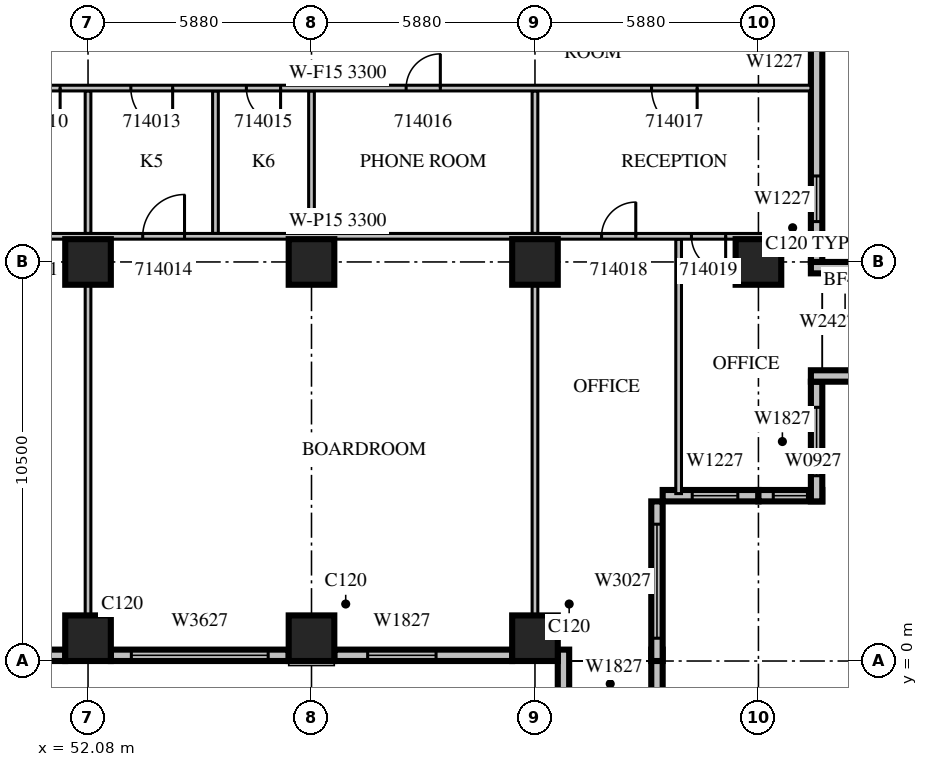
"""IFC4 building model, lengths in metres.
Left out: names, types, materials, properties, quantities, classifications, styles, units other than length and angle.
Written with IfcOpenShell. Run it as: python <this file> out.ifc"""

import sys

from ifc_helpers import new_model, si_unit, direction, frame, frame_2d, origin, origin_2d, place, context, subcontext, project, spatial, rectangle, extrude, source, transform, mapped, element, fill, save


model = new_model("IFC4")
c1 = context("Model", 3, precision=1e-05, world=origin(), true_north=direction((0.0, 1.0)))
c2 = subcontext(c1, "Body", "Model", "MODEL_VIEW")
j1 = project(units=[si_unit("LENGTHUNIT", "METRE"), si_unit("PLANEANGLEUNIT", "RADIAN")], contexts=[c1])
p1 = place(None, origin())
s1 = spatial("IfcSite", under=j1, at=p1, CompositionType="ELEMENT")
p2 = place(p1, origin())
s2 = spatial("IfcBuilding", under=s1, at=p2, CompositionType="ELEMENT")
p3 = place(p2, frame((0.0, 0.0, 69.9)))
s3 = spatial("IfcBuildingStorey", under=s2, at=p3, CompositionType="ELEMENT", Elevation=69.9)
m1 = source(origin(), c2, "Body", "SweptSolid", [
    extrude(rectangle(XDim=1.2, YDim=1.2, at=origin_2d()), origin(), (0.0, 0.0, 1.0), 4.2),
])
for number, where, z_axis, x_axis in (
    (1, (52.08, 0.6, 0.0), (0.0, 0.0, 1.0), (1.0, 0.0, 0.0)),
    (2, (57.96, 0.6, 0.0), (0.0, 0.0, 1.0), (1.0, 0.0, 0.0)),
    (3, (63.84, 0.6, 0.0), (0.0, 0.0, 1.0), (1.0, 0.0, 0.0)),
    (4, (52.08, 10.5, 0.0), (0.0, 0.0, 1.0), (1.0, 0.0, 0.0)),
    (5, (57.96, 10.5, 0.0), (0.0, 0.0, 1.0), (1.0, 0.0, 0.0)),
    (6, (63.84, 10.5, 0.0), (0.0, 0.0, 1.0), (1.0, 0.0, 0.0)),
    (7, (69.72, 10.5, 0.0), (0.0, 0.0, 1.0), (1.0, 0.0, 0.0)),
):
    element("IfcColumn", number, at=place(p3, frame(where, z_axis=z_axis, x_axis=x_axis)), inside=s3, PredefinedType="COLUMN", context=c2, shape_type="MappedRepresentation", body=[
        mapped(m1, transform((0.0, 0.0, 0.0), scale=1.0)),
    ])
m2 = source(origin(), c2, "Body", "SweptSolid", [
    extrude(rectangle(XDim=4.68, YDim=0.3, at=frame_2d((2.34, 0.0))), origin(), (0.0, 0.0, 1.0), 3.3),
])
p4 = place(p3, frame((46.8, 0.15, 0.0), z_axis=(0.0, 0.0, 1.0), x_axis=(1.0, 0.0, 0.0)))
e8 = element("IfcWall", 8, at=p4, inside=s3, PredefinedType="STANDARD", context=c2, shape_type="MappedRepresentation", body=[
    mapped(m2, transform((0.0, 0.0, 0.0), scale=1.0)),
])
m3 = source(origin(), c2, "Body", "SweptSolid", [
    extrude(rectangle(XDim=3.6, YDim=2.7, at=frame_2d((1.8, 1.35))), frame((0.0, 0.16, 0.0), z_axis=(0.0, -1.0, 0.0), x_axis=(1.0, 0.0, 0.0)), (0.0, 0.0, 1.0), 0.32),
])
p5 = place(p4, frame((0.54, 0.0, 0.6)))
e9 = element("IfcOpeningElement", 9, at=p5, cuts=e8, PredefinedType="OPENING", context=c2, shape_type="MappedRepresentation", body=[
    mapped(m3, transform((0.0, 0.0, 0.0), scale=1.0)),
])
m4 = source(origin(), c2, "Body", "SweptSolid", [
    extrude(rectangle(XDim=4.68, YDim=0.3, at=frame_2d((2.34, 0.0))), origin(), (0.0, 0.0, 1.0), 3.8),
])
p6 = place(p3, frame((52.68, 0.15, 0.0), z_axis=(0.0, 0.0, 1.0), x_axis=(1.0, 0.0, 0.0)))
e10 = element("IfcWall", 10, at=p6, inside=s3, PredefinedType="STANDARD", context=c2, shape_type="MappedRepresentation", body=[
    mapped(m4, transform((0.0, 0.0, 0.0), scale=1.0)),
])
p7 = place(p6, frame((0.54, 0.0, 0.6)))
e11 = element("IfcOpeningElement", 11, at=p7, cuts=e10, PredefinedType="OPENING", context=c2, shape_type="MappedRepresentation", body=[
    mapped(m3, transform((0.0, 0.0, 0.0), scale=1.0)),
])
p8 = place(p3, frame((58.56, 0.15, 0.0), z_axis=(0.0, 0.0, 1.0), x_axis=(1.0, 0.0, 0.0)))
e12 = element("IfcWall", 12, at=p8, inside=s3, PredefinedType="STANDARD", context=c2, shape_type="MappedRepresentation", body=[
    mapped(m4, transform((0.0, 0.0, 0.0), scale=1.0)),
])
m5 = source(origin(), c2, "Body", "SweptSolid", [
    extrude(rectangle(XDim=1.8, YDim=2.7, at=frame_2d((0.9, 1.35))), frame((0.0, 0.16, 0.0), z_axis=(0.0, -1.0, 0.0), x_axis=(1.0, 0.0, 0.0)), (0.0, 0.0, 1.0), 0.32),
])
p9 = place(p8, frame((0.877, 0.0, 0.6)))
e13 = element("IfcOpeningElement", 13, at=p9, cuts=e12, PredefinedType="OPENING", context=c2, shape_type="MappedRepresentation", body=[
    mapped(m5, transform((0.0, 0.0, 0.0), scale=1.0)),
])
m6 = source(origin(), c2, "Body", "SweptSolid", [
    extrude(rectangle(XDim=1.2, YDim=0.3, at=frame_2d((0.6, 0.0))), origin(), (0.0, 0.0, 1.0), 3.8),
])
for number, where, z_axis, x_axis in (
    (14, (64.59, 0.3, 0.0), (0.0, 0.0, 1.0), (0.0, -1.0, 0.0)),
    (15, (67.05, 0.3, 0.0), (0.0, 0.0, 1.0), (0.0, -1.0, 0.0)),
):
    element("IfcWall", number, at=place(p3, frame(where, z_axis=z_axis, x_axis=x_axis)), inside=s3, PredefinedType="STANDARD", context=c2, shape_type="MappedRepresentation", body=[
        mapped(m6, transform((0.0, 0.0, 0.0), scale=1.0)),
    ])
m7 = source(origin(), c2, "Body", "SweptSolid", [
    extrude(rectangle(XDim=4.2, YDim=0.3, at=frame_2d((2.1, 0.0))), origin(), (0.0, 0.0, 1.0), 3.8),
])
p10 = place(p3, frame((67.05, 0.0, 0.0), z_axis=(0.0, 0.0, 1.0), x_axis=(0.0, 1.0, 0.0)))
e16 = element("IfcWall", 16, at=p10, inside=s3, PredefinedType="STANDARD", context=c2, shape_type="MappedRepresentation", body=[
    mapped(m7, transform((0.0, 0.0, 0.0), scale=1.0)),
])
m8 = source(origin(), c2, "Body", "SweptSolid", [
    extrude(rectangle(XDim=3.0, YDim=2.7, at=frame_2d((1.5, 1.35))), frame((0.0, 0.16, 0.0), z_axis=(0.0, -1.0, 0.0), x_axis=(1.0, 0.0, 0.0)), (0.0, 0.0, 1.0), 0.32),
])
p11 = place(p10, frame((0.6, 0.0, 0.6)))
e17 = element("IfcOpeningElement", 17, at=p11, cuts=e16, PredefinedType="OPENING", context=c2, shape_type="MappedRepresentation", body=[
    mapped(m8, transform((0.0, 0.0, 0.0), scale=1.0)),
])
m9 = source(origin(), c2, "Body", "SweptSolid", [
    extrude(rectangle(XDim=2.52, YDim=0.3, at=frame_2d((1.26, 0.0))), origin(), (0.0, 0.0, 1.0), 3.8),
])
p12 = place(p3, frame((67.2, 4.35, 0.0), z_axis=(0.0, 0.0, 1.0), x_axis=(1.0, 0.0, 0.0)))
e18 = element("IfcWall", 18, at=p12, inside=s3, PredefinedType="STANDARD", context=c2, shape_type="MappedRepresentation", body=[
    mapped(m9, transform((0.0, 0.0, 0.0), scale=1.0)),
])
m10 = source(origin(), c2, "Body", "SweptSolid", [
    extrude(rectangle(XDim=1.2, YDim=2.7, at=frame_2d((0.6, 1.35))), frame((0.0, 0.16, 0.0), z_axis=(0.0, -1.0, 0.0), x_axis=(1.0, 0.0, 0.0)), (0.0, 0.0, 1.0), 0.32),
])
p13 = place(p12, frame((0.777, 0.0, 0.6)))
e19 = element("IfcOpeningElement", 19, at=p13, cuts=e18, PredefinedType="OPENING", context=c2, shape_type="MappedRepresentation", body=[
    mapped(m10, transform((0.0, 0.0, 0.0), scale=1.0)),
])
m11 = source(origin(), c2, "Body", "SweptSolid", [
    extrude(rectangle(XDim=1.68, YDim=0.3, at=frame_2d((0.84, 0.0))), origin(), (0.0, 0.0, 1.0), 3.8),
])
p14 = place(p3, frame((69.72, 4.35, 0.0), z_axis=(0.0, 0.0, 1.0), x_axis=(1.0, 0.0, 0.0)))
e20 = element("IfcWall", 20, at=p14, inside=s3, PredefinedType="STANDARD", context=c2, shape_type="MappedRepresentation", body=[
    mapped(m11, transform((0.0, 0.0, 0.0), scale=1.0)),
])
m12 = source(origin(), c2, "Body", "SweptSolid", [
    extrude(rectangle(XDim=0.9, YDim=2.7, at=frame_2d((0.45, 1.35))), frame((0.0, 0.16, 0.0), z_axis=(0.0, -1.0, 0.0), x_axis=(1.0, 0.0, 0.0)), (0.0, 0.0, 1.0), 0.32),
])
p15 = place(p14, frame((0.39, 0.0, 0.6)))
e21 = element("IfcOpeningElement", 21, at=p15, cuts=e20, PredefinedType="OPENING", context=c2, shape_type="MappedRepresentation", body=[
    mapped(m12, transform((0.0, 0.0, 0.0), scale=1.0)),
])
m13 = source(origin(), c2, "Body", "SweptSolid", [
    extrude(rectangle(XDim=3.15, YDim=0.3, at=frame_2d((1.575, 0.0))), origin(), (0.0, 0.0, 1.0), 3.8),
])
p16 = place(p3, frame((71.25, 4.2, 0.0), z_axis=(0.0, 0.0, 1.0), x_axis=(0.0, 1.0, 0.0)))
e22 = element("IfcWall", 22, at=p16, inside=s3, PredefinedType="STANDARD", context=c2, shape_type="MappedRepresentation", body=[
    mapped(m13, transform((0.0, 0.0, 0.0), scale=1.0)),
])
p17 = place(p16, frame((0.675, 0.0, 0.6)))
e23 = element("IfcOpeningElement", 23, at=p17, cuts=e22, PredefinedType="OPENING", context=c2, shape_type="MappedRepresentation", body=[
    mapped(m5, transform((0.0, 0.0, 0.0), scale=1.0)),
])
for number, where, z_axis, x_axis in (
    (24, (71.1, 7.5, 0.0), (0.0, 0.0, 1.0), (1.0, 0.0, 0.0)),
    (25, (71.1, 10.35, 0.0), (0.0, 0.0, 1.0), (1.0, 0.0, 0.0)),
):
    element("IfcWall", number, at=place(p3, frame(where, z_axis=z_axis, x_axis=x_axis)), inside=s3, PredefinedType="STANDARD", context=c2, shape_type="MappedRepresentation", body=[
        mapped(m6, transform((0.0, 0.0, 0.0), scale=1.0)),
    ])
m14 = source(origin(), c2, "Body", "SweptSolid", [
    extrude(rectangle(XDim=6.3, YDim=0.3, at=frame_2d((3.15, 0.0))), origin(), (0.0, 0.0, 1.0), 3.8),
])
p18 = place(p3, frame((71.25, 10.5, 0.0), z_axis=(0.0, 0.0, 1.0), x_axis=(0.0, 1.0, 0.0)))
e26 = element("IfcWall", 26, at=p18, inside=s3, PredefinedType="STANDARD", context=c2, shape_type="MappedRepresentation", body=[
    mapped(m14, transform((0.0, 0.0, 0.0), scale=1.0)),
])
p19 = place(p18, frame((1.062, 0.0, 0.6)))
e27 = element("IfcOpeningElement", 27, at=p19, cuts=e26, PredefinedType="OPENING", context=c2, shape_type="MappedRepresentation", body=[
    mapped(m10, transform((0.0, 0.0, 0.0), scale=1.0)),
])
m15 = source(origin(), c2, "Body", "SweptSolid", [
    extrude(rectangle(XDim=3.75, YDim=0.15, at=frame_2d((1.875, 0.0))), origin(), (0.0, 0.0, 1.0), 3.8),
])
for number, where, z_axis, x_axis in (
    (28, (55.433, 11.25, 0.0), (0.0, 0.0, 1.0), (0.0, 1.0, 0.0)),
    (29, (57.96, 11.25, 0.0), (0.0, 0.0, 1.0), (0.0, 1.0, 0.0)),
):
    element("IfcWall", number, at=place(p3, frame(where, z_axis=z_axis, x_axis=x_axis)), inside=s3, PredefinedType="PARTITIONING", context=c2, shape_type="MappedRepresentation", body=[
        mapped(m15, transform((0.0, 0.0, 0.0), scale=1.0)),
    ])
m16 = source(origin(), c2, "Body", "SweptSolid", [
    extrude(rectangle(XDim=6.695, YDim=0.15, at=frame_2d((3.348, 0.0))), origin(), (0.0, 0.0, 1.0), 3.8),
])
p20 = place(p3, frame((67.62, 4.405, 0.0), z_axis=(0.0, 0.0, 1.0), x_axis=(0.0, 1.0, 0.0)))
e30 = element("IfcWall", 30, at=p20, inside=s3, PredefinedType="PARTITIONING", context=c2, shape_type="MappedRepresentation", body=[
    mapped(m16, transform((0.0, 0.0, 0.0), scale=1.0)),
])
m17 = source(origin(), c2, "Body", "SweptSolid", [
    extrude(rectangle(XDim=8.702, YDim=0.15, at=frame_2d((4.351, 0.0))), origin(), (0.0, 0.0, 1.0), 3.8),
])
p21 = place(p3, frame((52.08, 1.199, 0.0), z_axis=(0.0, 0.0, 1.0), x_axis=(0.0, 1.0, 0.0)))
e31 = element("IfcWall", 31, at=p21, inside=s3, PredefinedType="PARTITIONING", context=c2, shape_type="MappedRepresentation", body=[
    mapped(m17, transform((0.0, 0.0, 0.0), scale=1.0)),
])
p22 = place(p3, frame((52.08, 11.25, 0.0), z_axis=(0.0, 0.0, 1.0), x_axis=(0.0, 1.0, 0.0)))
e32 = element("IfcWall", 32, at=p22, inside=s3, PredefinedType="PARTITIONING", context=c2, shape_type="MappedRepresentation", body=[
    mapped(m15, transform((0.0, 0.0, 0.0), scale=1.0)),
])
p23 = place(p3, frame((63.84, 1.199, 0.0), z_axis=(0.0, 0.0, 1.0), x_axis=(0.0, 1.0, 0.0)))
e33 = element("IfcWall", 33, at=p23, inside=s3, PredefinedType="PARTITIONING", context=c2, shape_type="MappedRepresentation", body=[
    mapped(m17, transform((0.0, 0.0, 0.0), scale=1.0)),
])
p24 = place(p3, frame((63.84, 11.25, 0.0), z_axis=(0.0, 0.0, 1.0), x_axis=(0.0, 1.0, 0.0)))
e34 = element("IfcWall", 34, at=p24, inside=s3, PredefinedType="PARTITIONING", context=c2, shape_type="MappedRepresentation", body=[
    mapped(m15, transform((0.0, 0.0, 0.0), scale=1.0)),
])
m18 = source(origin(), c2, "Body", "SweptSolid", [
    extrude(rectangle(XDim=24.9, YDim=0.15, at=frame_2d((12.45, 0.0))), origin(), (0.0, 0.0, 1.0), 3.3),
])
p25 = place(p3, frame((71.1, 11.175, 0.0), z_axis=(0.0, 0.0, 1.0), x_axis=(-1.0, 0.0, 0.0)))
e35 = element("IfcWall", 35, at=p25, inside=s3, PredefinedType="PARTITIONING", context=c2, shape_type="MappedRepresentation", body=[
    mapped(m18, transform((0.0, 0.0, 0.0), scale=1.0)),
])
m19 = source(origin(), c2, "Body", "SweptSolid", [
    extrude(rectangle(XDim=1.1, YDim=2.1, at=frame_2d((0.55, 1.05))), frame((0.0, 0.085, 0.0), z_axis=(0.0, -1.0, 0.0), x_axis=(1.0, 0.0, 0.0)), (0.0, 0.0, 1.0), 0.17),
])
p26 = place(p25, frame((20.017, 0.0, 0.0)))
e36 = element("IfcOpeningElement", 36, at=p26, cuts=e35, PredefinedType="OPENING", context=c2, shape_type="MappedRepresentation", body=[
    mapped(m19, transform((0.0, 0.0, 0.0), scale=1.0)),
])
p27 = place(p25, frame((16.481, 0.0, 0.0)))
e37 = element("IfcOpeningElement", 37, at=p27, cuts=e35, PredefinedType="OPENING", context=c2, shape_type="MappedRepresentation", body=[
    mapped(m19, transform((0.0, 0.0, 0.0), scale=1.0)),
])
m20 = source(origin(), c2, "Body", "SweptSolid", [
    extrude(rectangle(XDim=0.9, YDim=2.1, at=frame_2d((0.45, 1.05))), frame((0.0, 0.085, 0.0), z_axis=(0.0, -1.0, 0.0), x_axis=(1.0, 0.0, 0.0)), (0.0, 0.0, 1.0), 0.17),
])
p28 = place(p25, frame((4.607, 0.0, 0.0)))
e38 = element("IfcOpeningElement", 38, at=p28, cuts=e35, PredefinedType="OPENING", context=c2, shape_type="MappedRepresentation", body=[
    mapped(m20, transform((0.0, 0.0, 0.0), scale=1.0)),
])
p29 = place(p25, frame((2.243, 0.0, 0.0)))
e39 = element("IfcOpeningElement", 39, at=p29, cuts=e35, PredefinedType="OPENING", context=c2, shape_type="MappedRepresentation", body=[
    mapped(m20, transform((0.0, 0.0, 0.0), scale=1.0)),
])
p30 = place(p3, frame((71.1, 15.075, 0.0), z_axis=(0.0, 0.0, 1.0), x_axis=(-1.0, 0.0, 0.0)))
e40 = element("IfcWall", 40, at=p30, inside=s3, PredefinedType="PARTITIONING", context=c2, shape_type="MappedRepresentation", body=[
    mapped(m18, transform((0.0, 0.0, 0.0), scale=1.0)),
])
p31 = place(p30, frame((19.754, 0.0, 0.0)))
e41 = element("IfcOpeningElement", 41, at=p31, cuts=e40, PredefinedType="OPENING", context=c2, shape_type="MappedRepresentation", body=[
    mapped(m19, transform((0.0, 0.0, 0.0), scale=1.0)),
])
p32 = place(p30, frame((22.794, 0.0, 0.0)))
e42 = element("IfcOpeningElement", 42, at=p32, cuts=e40, PredefinedType="OPENING", context=c2, shape_type="MappedRepresentation", body=[
    mapped(m20, transform((0.0, 0.0, 0.0), scale=1.0)),
])
p33 = place(p30, frame((16.794, 0.0, 0.0)))
e43 = element("IfcOpeningElement", 43, at=p33, cuts=e40, PredefinedType="OPENING", context=c2, shape_type="MappedRepresentation", body=[
    mapped(m19, transform((0.0, 0.0, 0.0), scale=1.0)),
])
p34 = place(p30, frame((13.954, 0.0, 0.0)))
e44 = element("IfcOpeningElement", 44, at=p34, cuts=e40, PredefinedType="OPENING", context=c2, shape_type="MappedRepresentation", body=[
    mapped(m20, transform((0.0, 0.0, 0.0), scale=1.0)),
])
p35 = place(p30, frame((9.75, 0.0, 0.0)))
e45 = element("IfcOpeningElement", 45, at=p35, cuts=e40, PredefinedType="OPENING", context=c2, shape_type="MappedRepresentation", body=[
    mapped(m20, transform((0.0, 0.0, 0.0), scale=1.0)),
])
m21 = source(origin(), c2, "Body", "SweptSolid", [
    extrude(rectangle(XDim=1.2, YDim=2.1, at=frame_2d((0.6, 1.05))), frame((0.0, 0.085, 0.0), z_axis=(0.0, -1.0, 0.0), x_axis=(1.0, 0.0, 0.0)), (0.0, 0.0, 1.0), 0.17),
])
p36 = place(p30, frame((2.993, 0.0, 0.0)))
e46 = element("IfcOpeningElement", 46, at=p36, cuts=e40, PredefinedType="OPENING", context=c2, shape_type="MappedRepresentation", body=[
    mapped(m21, transform((0.0, 0.0, 0.0), scale=1.0)),
])
m22 = source(origin(), c2, "Body", "SweptSolid", [
    extrude(rectangle(XDim=3.6, YDim=2.7, at=frame_2d((1.8, 1.35))), frame((0.0, 0.03, 0.0), z_axis=(0.0, -1.0, 0.0), x_axis=(1.0, 0.0, 0.0)), (0.0, 0.0, 1.0), 0.06),
])
p37 = place(p7, origin())
e47 = element("IfcWindow", 47, at=p37, inside=s3, PartitioningType="SINGLE_PANEL", PredefinedType="WINDOW", context=c2, shape_type="MappedRepresentation", body=[
    mapped(m22, transform((0.0, 0.0, 0.0), scale=1.0)),
])
fill(e11, e47)
m23 = source(origin(), c2, "Body", "SweptSolid", [
    extrude(rectangle(XDim=1.8, YDim=2.7, at=frame_2d((0.9, 1.35))), frame((0.0, 0.03, 0.0), z_axis=(0.0, -1.0, 0.0), x_axis=(1.0, 0.0, 0.0)), (0.0, 0.0, 1.0), 0.06),
])
p38 = place(p9, origin())
e48 = element("IfcWindow", 48, at=p38, inside=s3, PartitioningType="SINGLE_PANEL", PredefinedType="WINDOW", context=c2, shape_type="MappedRepresentation", body=[
    mapped(m23, transform((0.0, 0.0, 0.0), scale=1.0)),
])
fill(e13, e48)
m24 = source(origin(), c2, "Body", "SweptSolid", [
    extrude(rectangle(XDim=3.0, YDim=2.7, at=frame_2d((1.5, 1.35))), frame((0.0, 0.03, 0.0), z_axis=(0.0, -1.0, 0.0), x_axis=(1.0, 0.0, 0.0)), (0.0, 0.0, 1.0), 0.06),
])
p39 = place(p11, origin())
e49 = element("IfcWindow", 49, at=p39, inside=s3, PartitioningType="SINGLE_PANEL", PredefinedType="WINDOW", context=c2, shape_type="MappedRepresentation", body=[
    mapped(m24, transform((0.0, 0.0, 0.0), scale=1.0)),
])
fill(e17, e49)
m25 = source(origin(), c2, "Body", "SweptSolid", [
    extrude(rectangle(XDim=1.2, YDim=2.7, at=frame_2d((0.6, 1.35))), frame((0.0, 0.03, 0.0), z_axis=(0.0, -1.0, 0.0), x_axis=(1.0, 0.0, 0.0)), (0.0, 0.0, 1.0), 0.06),
])
p40 = place(p13, origin())
e50 = element("IfcWindow", 50, at=p40, inside=s3, PartitioningType="SINGLE_PANEL", PredefinedType="WINDOW", context=c2, shape_type="MappedRepresentation", body=[
    mapped(m25, transform((0.0, 0.0, 0.0), scale=1.0)),
])
fill(e19, e50)
m26 = source(origin(), c2, "Body", "SweptSolid", [
    extrude(rectangle(XDim=0.9, YDim=2.7, at=frame_2d((0.45, 1.35))), frame((0.0, 0.03, 0.0), z_axis=(0.0, -1.0, 0.0), x_axis=(1.0, 0.0, 0.0)), (0.0, 0.0, 1.0), 0.06),
])
p41 = place(p15, origin())
e51 = element("IfcWindow", 51, at=p41, inside=s3, PartitioningType="SINGLE_PANEL", PredefinedType="WINDOW", context=c2, shape_type="MappedRepresentation", body=[
    mapped(m26, transform((0.0, 0.0, 0.0), scale=1.0)),
])
fill(e21, e51)
p42 = place(p17, origin())
e52 = element("IfcWindow", 52, at=p42, inside=s3, PartitioningType="SINGLE_PANEL", PredefinedType="WINDOW", context=c2, shape_type="MappedRepresentation", body=[
    mapped(m23, transform((0.0, 0.0, 0.0), scale=1.0)),
])
fill(e23, e52)
p43 = place(p19, origin())
e53 = element("IfcWindow", 53, at=p43, inside=s3, PartitioningType="SINGLE_PANEL", PredefinedType="WINDOW", context=c2, shape_type="MappedRepresentation", body=[
    mapped(m25, transform((0.0, 0.0, 0.0), scale=1.0)),
])
fill(e27, e53)
m27 = source(origin(), c2, "Body", "SweptSolid", [
    extrude(rectangle(XDim=1.1, YDim=2.1, at=frame_2d((0.55, 1.05))), frame((0.0, 0.025, 0.0), z_axis=(0.0, -1.0, 0.0), x_axis=(1.0, 0.0, 0.0)), (0.0, 0.0, 1.0), 0.05),
])
p44 = place(p31, origin())
e54 = element("IfcDoor", 54, at=p44, inside=s3, OperationType="SINGLE_SWING_LEFT", PredefinedType="DOOR", context=c2, shape_type="MappedRepresentation", body=[
    mapped(m27, transform((0.0, 0.0, 0.0), scale=1.0)),
])
fill(e41, e54)
p45 = place(p33, origin())
e55 = element("IfcDoor", 55, at=p45, inside=s3, OperationType="SINGLE_SWING_LEFT", PredefinedType="DOOR", context=c2, shape_type="MappedRepresentation", body=[
    mapped(m27, transform((0.0, 0.0, 0.0), scale=1.0)),
])
fill(e43, e55)
p46 = place(p27, origin())
e56 = element("IfcDoor", 56, at=p46, inside=s3, OperationType="SINGLE_SWING_RIGHT", PredefinedType="DOOR", context=c2, shape_type="MappedRepresentation", body=[
    mapped(m27, transform((0.0, 0.0, 0.0), scale=1.0)),
])
fill(e37, e56)
m28 = source(origin(), c2, "Body", "SweptSolid", [
    extrude(rectangle(XDim=0.9, YDim=2.1, at=frame_2d((0.45, 1.05))), frame((0.0, 0.025, 0.0), z_axis=(0.0, -1.0, 0.0), x_axis=(1.0, 0.0, 0.0)), (0.0, 0.0, 1.0), 0.05),
])
p47 = place(p34, origin())
e57 = element("IfcDoor", 57, at=p47, inside=s3, OperationType="SINGLE_SWING_LEFT", PredefinedType="DOOR", context=c2, shape_type="MappedRepresentation", body=[
    mapped(m28, transform((0.0, 0.0, 0.0), scale=1.0)),
])
fill(e44, e57)
p48 = place(p35, origin())
e58 = element("IfcDoor", 58, at=p48, inside=s3, OperationType="SINGLE_SWING_RIGHT", PredefinedType="DOOR", context=c2, shape_type="MappedRepresentation", body=[
    mapped(m28, transform((0.0, 0.0, 0.0), scale=1.0)),
])
fill(e45, e58)
m29 = source(origin(), c2, "Body", "SweptSolid", [
    extrude(rectangle(XDim=1.2, YDim=2.1, at=frame_2d((0.6, 1.05))), frame((0.0, 0.025, 0.0), z_axis=(0.0, -1.0, 0.0), x_axis=(1.0, 0.0, 0.0)), (0.0, 0.0, 1.0), 0.05),
])
p49 = place(p36, origin())
e59 = element("IfcDoor", 59, at=p49, inside=s3, OperationType="SINGLE_SWING_LEFT", PredefinedType="DOOR", context=c2, shape_type="MappedRepresentation", body=[
    mapped(m29, transform((0.0, 0.0, 0.0), scale=1.0)),
])
fill(e46, e59)
p50 = place(p28, origin())
e60 = element("IfcDoor", 60, at=p50, inside=s3, OperationType="SINGLE_SWING_RIGHT", PredefinedType="DOOR", context=c2, shape_type="MappedRepresentation", body=[
    mapped(m28, transform((0.0, 0.0, 0.0), scale=1.0)),
])
fill(e38, e60)
p51 = place(p29, origin())
e61 = element("IfcDoor", 61, at=p51, inside=s3, OperationType="SINGLE_SWING_LEFT", PredefinedType="DOOR", context=c2, shape_type="MappedRepresentation", body=[
    mapped(m28, transform((0.0, 0.0, 0.0), scale=1.0)),
])
fill(e39, e61)
save(model, sys.argv[1])
